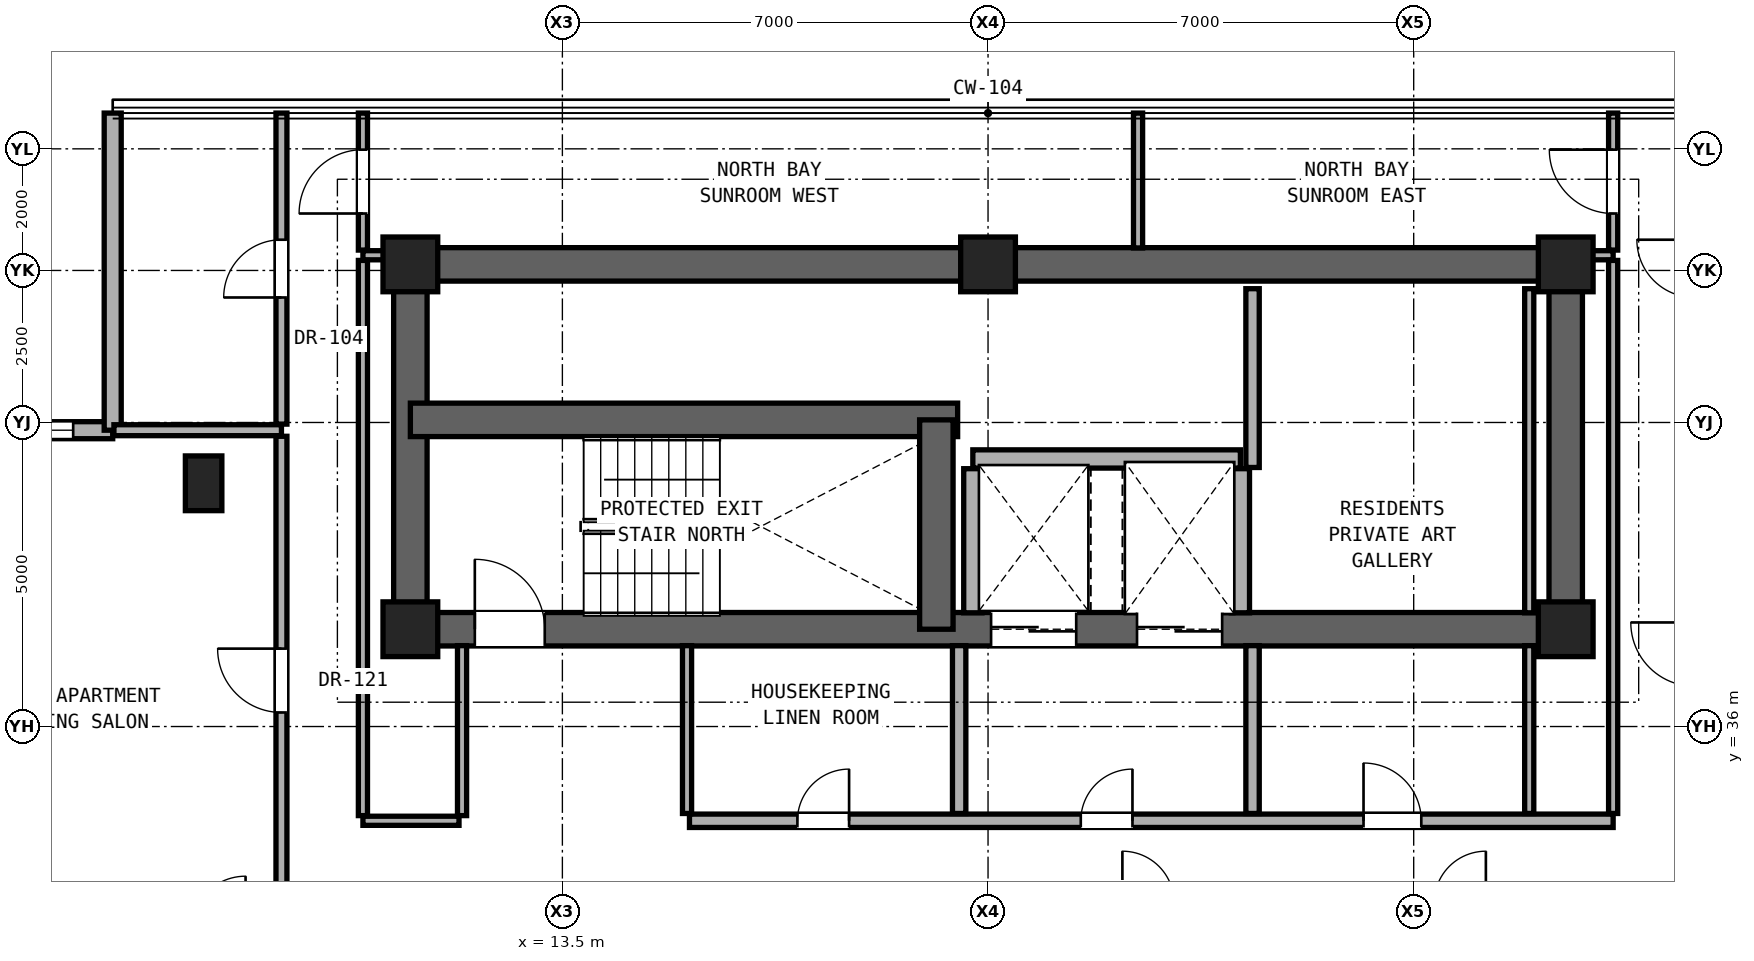
"""IFC4 building model, lengths in metres.
Left out: names, types, materials, properties, quantities, classifications, styles, units other than length and angle.
Written with IfcOpenShell. Run it as: python <this file> out.ifc"""

import sys

from ifc_helpers import new_model, si_unit, direction, frame, frame_2d, origin, origin_2d, place, context, subcontext, project, spatial, rectangle, extrude, element, fill, save


model = new_model("IFC4")
c1 = context("Model", 3, precision=1e-05, world=origin(), true_north=direction((0.0, 1.0)))
c2 = subcontext(c1, "Body", "Model", "MODEL_VIEW")
j1 = project(units=[si_unit("LENGTHUNIT", "METRE"), si_unit("PLANEANGLEUNIT", "RADIAN")], contexts=[c1])
p1 = place(None, origin())
s1 = spatial("IfcSite", under=j1, at=p1, CompositionType="ELEMENT")
p2 = place(p1, origin())
s2 = spatial("IfcBuilding", under=s1, at=p2, CompositionType="ELEMENT")
p3 = place(p2, frame((0.0, 0.0, 186.9)))
s3 = spatial("IfcBuildingStorey", under=s2, at=p3, CompositionType="ELEMENT", Elevation=186.9)
for number, where, z_axis, x_axis in (
    (1, (11.0, 37.6, 0.0), (0.0, 0.0, 1.0), (1.0, 0.0, 0.0)),
    (2, (30.0, 37.6, 0.0), (0.0, 0.0, 1.0), (1.0, 0.0, 0.0)),
    (3, (11.0, 43.6, 0.0), (0.0, 0.0, 1.0), (1.0, 0.0, 0.0)),
    (4, (20.5, 43.6, 0.0), (0.0, 0.0, 1.0), (1.0, 0.0, 0.0)),
    (5, (30.0, 43.6, 0.0), (0.0, 0.0, 1.0), (1.0, 0.0, 0.0)),
):
    element("IfcColumn", number, at=place(p3, frame(where, z_axis=z_axis, x_axis=x_axis)), inside=s3, PredefinedType="COLUMN", context=c2, shape_type="SweptSolid", body=[
        extrude(rectangle(XDim=0.9, YDim=0.9, at=origin_2d()), origin(), (0.0, 0.0, 1.0), 3.25),
    ])
p4 = place(p3, frame((7.6, 40.0, 0.0), z_axis=(0.0, 0.0, 1.0), x_axis=(1.0, 0.0, 0.0)))
e6 = element("IfcColumn", 6, at=p4, inside=s3, PredefinedType="PILASTER", context=c2, shape_type="SweptSolid", body=[
    extrude(rectangle(XDim=0.6, YDim=0.9, at=origin_2d()), origin(), (0.0, 0.0, 1.0), 3.25),
])
p5 = place(p3, frame((11.0, 43.6, 0.0), z_axis=(0.0, 0.0, 1.0), x_axis=(1.0, 0.0, 0.0)))
e7 = element("IfcWall", 7, at=p5, inside=s3, PredefinedType="SHEAR", context=c2, shape_type="SweptSolid", body=[
    extrude(rectangle(XDim=19.0, YDim=0.55, at=frame_2d((9.5, 0.0))), origin(), (0.0, 0.0, 1.0), 3.05),
])
for number, where, z_axis, x_axis in (
    (8, (11.0, 37.6, 0.0), (0.0, 0.0, 1.0), (0.0, 1.0, 0.0)),
    (9, (30.0, 37.6, 0.0), (0.0, 0.0, 1.0), (0.0, 1.0, 0.0)),
):
    element("IfcWall", number, at=place(p3, frame(where, z_axis=z_axis, x_axis=x_axis)), inside=s3, PredefinedType="SHEAR", context=c2, shape_type="SweptSolid", body=[
        extrude(rectangle(XDim=6.0, YDim=0.55, at=frame_2d((3.0, 0.0))), origin(), (0.0, 0.0, 1.0), 3.05),
    ])
p6 = place(p3, frame((11.0, 37.6, 0.0), z_axis=(0.0, 0.0, 1.0), x_axis=(1.0, 0.0, 0.0)))
e10 = element("IfcWall", 10, at=p6, inside=s3, PredefinedType="SHEAR", context=c2, shape_type="SweptSolid", body=[
    extrude(rectangle(XDim=19.0, YDim=0.55, at=frame_2d((9.5, 0.0))), origin(), (0.0, 0.0, 1.0), 3.05),
])
p7 = place(p6, frame((1.06, 0.0, 0.0)))
e11 = element("IfcOpeningElement", 11, at=p7, cuts=e10, PredefinedType="OPENING", context=c2, shape_type="SweptSolid", body=[
    extrude(rectangle(XDim=1.15, YDim=2.2, at=frame_2d((0.575, 1.1))), frame((0.0, 0.285, 0.0), z_axis=(0.0, -1.0, 0.0), x_axis=(1.0, 0.0, 0.0)), (0.0, 0.0, 1.0), 0.57),
])
p8 = place(p6, frame((9.55, 0.0, 0.0)))
e12 = element("IfcOpeningElement", 12, at=p8, cuts=e10, PredefinedType="OPENING", context=c2, shape_type="SweptSolid", body=[
    extrude(rectangle(XDim=1.4, YDim=2.35, at=frame_2d((0.7, 1.175))), frame((0.0, 0.285, 0.0), z_axis=(0.0, -1.0, 0.0), x_axis=(1.0, 0.0, 0.0)), (0.0, 0.0, 1.0), 0.57),
])
p9 = place(p6, frame((11.95, 0.0, 0.0)))
e13 = element("IfcOpeningElement", 13, at=p9, cuts=e10, PredefinedType="OPENING", context=c2, shape_type="SweptSolid", body=[
    extrude(rectangle(XDim=1.4, YDim=2.35, at=frame_2d((0.7, 1.175))), frame((0.0, 0.285, 0.0), z_axis=(0.0, -1.0, 0.0), x_axis=(1.0, 0.0, 0.0)), (0.0, 0.0, 1.0), 0.57),
])
p10 = place(p3, frame((11.0, 41.043, 0.0), z_axis=(0.0, 0.0, 1.0), x_axis=(1.0, 0.0, 0.0)))
e14 = element("IfcWall", 14, at=p10, inside=s3, PredefinedType="SHEAR", context=c2, shape_type="SweptSolid", body=[
    extrude(rectangle(XDim=9.0, YDim=0.55, at=frame_2d((4.5, 0.0))), origin(), (0.0, 0.0, 1.0), 3.05),
])
p11 = place(p3, frame((19.65, 37.6, 0.0), z_axis=(0.0, 0.0, 1.0), x_axis=(0.0, 1.0, 0.0)))
e15 = element("IfcWall", 15, at=p11, inside=s3, PredefinedType="SHEAR", context=c2, shape_type="SweptSolid", body=[
    extrude(rectangle(XDim=3.443, YDim=0.55, at=frame_2d((1.721, 0.0))), origin(), (0.0, 0.0, 1.0), 3.05),
])
p12 = place(p3, frame((6.105, 40.873, 0.0), z_axis=(0.0, 0.0, 1.0), x_axis=(-1.0, 0.0, 0.0)))
e16 = element("IfcWall", 16, at=p12, inside=s3, PredefinedType="SOLIDWALL", context=c2, shape_type="SweptSolid", body=[
    extrude(rectangle(XDim=5.215, YDim=0.28, at=frame_2d((2.607, 0.0))), origin(), (0.0, 0.0, 1.0), 3.03),
])
p13 = place(p12, frame((0.65, 0.0, 0.85)))
e17 = element("IfcOpeningElement", 17, at=p13, cuts=e16, PredefinedType="OPENING", context=c2, shape_type="SweptSolid", body=[
    extrude(rectangle(XDim=1.1, YDim=2.0, at=frame_2d((0.55, 1.0))), frame((0.0, 0.15, 0.0), z_axis=(0.0, -1.0, 0.0), x_axis=(1.0, 0.0, 0.0)), (0.0, 0.0, 1.0), 0.3),
])
p14 = place(p3, frame((6.105, 46.088, 0.0), z_axis=(0.0, 0.0, 1.0), x_axis=(0.0, -1.0, 0.0)))
e18 = element("IfcWall", 18, at=p14, inside=s3, PredefinedType="SOLIDWALL", context=c2, shape_type="SweptSolid", body=[
    extrude(rectangle(XDim=5.215, YDim=0.28, at=frame_2d((2.607, 0.0))), origin(), (0.0, 0.0, 1.0), 3.03),
])
p15 = place(p3, frame((10.22, 34.45, 0.0), z_axis=(0.0, 0.0, 1.0), x_axis=(1.0, 0.0, 0.0)))
e19 = element("IfcWall", 19, at=p15, inside=s3, PredefinedType="PARTITIONING", context=c2, shape_type="SweptSolid", body=[
    extrude(rectangle(XDim=1.58, YDim=0.15, at=frame_2d((0.79, 0.0))), origin(), (0.0, 0.0, 1.0), 2.186),
])
p16 = place(p3, frame((15.59, 34.45, 0.0), z_axis=(0.0, 0.0, 1.0), x_axis=(1.0, 0.0, 0.0)))
e20 = element("IfcWall", 20, at=p16, inside=s3, PredefinedType="SOLIDWALL", context=c2, shape_type="SweptSolid", body=[
    extrude(rectangle(XDim=15.19, YDim=0.22, at=frame_2d((7.595, 0.0))), origin(), (0.0, 0.0, 1.0), 2.186),
])
p17 = place(p16, frame((6.435, 0.0, 0.0)))
e21 = element("IfcOpeningElement", 21, at=p17, cuts=e20, PredefinedType="OPENING", context=c2, shape_type="SweptSolid", body=[
    extrude(rectangle(XDim=0.85, YDim=2.01, at=frame_2d((0.425, 1.005))), frame((0.0, 0.12, 0.0), z_axis=(0.0, -1.0, 0.0), x_axis=(1.0, 0.0, 0.0)), (0.0, 0.0, 1.0), 0.24),
])
p18 = place(p16, frame((11.085, 0.0, 0.0)))
e22 = element("IfcOpeningElement", 22, at=p18, cuts=e20, PredefinedType="OPENING", context=c2, shape_type="SweptSolid", body=[
    extrude(rectangle(XDim=0.95, YDim=2.15, at=frame_2d((0.475, 1.075))), frame((0.0, 0.12, 0.0), z_axis=(0.0, -1.0, 0.0), x_axis=(1.0, 0.0, 0.0)), (0.0, 0.0, 1.0), 0.24),
])
p19 = place(p16, frame((1.775, 0.0, 0.0)))
e23 = element("IfcOpeningElement", 23, at=p19, cuts=e20, PredefinedType="OPENING", context=c2, shape_type="SweptSolid", body=[
    extrude(rectangle(XDim=0.85, YDim=2.01, at=frame_2d((0.425, 1.005))), frame((0.0, 0.12, 0.0), z_axis=(0.0, -1.0, 0.0), x_axis=(1.0, 0.0, 0.0)), (0.0, 0.0, 1.0), 0.24),
])
p20 = place(p3, frame((20.25, 40.4, 0.0), z_axis=(0.0, 0.0, 1.0), x_axis=(1.0, 0.0, 0.0)))
e24 = element("IfcWall", 24, at=p20, inside=s3, PredefinedType="SOLIDWALL", context=c2, shape_type="SweptSolid", body=[
    extrude(rectangle(XDim=4.4, YDim=0.3, at=frame_2d((2.2, 0.0))), origin(), (0.0, 0.0, 1.0), 3.05),
])
p21 = place(p3, frame((6.125, 40.873, 0.0), z_axis=(0.0, 0.0, 1.0), x_axis=(1.0, 0.0, 0.0)))
e25 = element("IfcWall", 25, at=p21, inside=s3, PredefinedType="PARTITIONING", context=c2, shape_type="SweptSolid", body=[
    extrude(rectangle(XDim=2.755, YDim=0.18, at=frame_2d((1.377, 0.0))), origin(), (0.0, 0.0, 1.0), 3.05),
])
for number, where, z_axis, x_axis in (
    (26, (10.22, 43.75, 0.0), (0.0, 0.0, 1.0), (1.0, 0.0, 0.0)),
    (27, (30.27, 43.75, 0.0), (0.0, 0.0, 1.0), (1.0, 0.0, 0.0)),
):
    element("IfcWall", number, at=place(p3, frame(where, z_axis=z_axis, x_axis=x_axis)), inside=s3, PredefinedType="PARTITIONING", context=c2, shape_type="SweptSolid", body=[
        extrude(rectangle(XDim=0.51, YDim=0.15, at=frame_2d((0.255, 0.0))), origin(), (0.0, 0.0, 1.0), 3.05),
    ])
p22 = place(p3, frame((8.88, 32.739, 0.0), z_axis=(0.0, 0.0, 1.0), x_axis=(0.0, 1.0, 0.0)))
e28 = element("IfcWall", 28, at=p22, inside=s3, PredefinedType="PARTITIONING", context=c2, shape_type="SweptSolid", body=[
    extrude(rectangle(XDim=8.034, YDim=0.18, at=frame_2d((4.017, 0.0))), origin(), (0.0, 0.0, 1.0), 2.442),
])
p23 = place(p22, frame((3.492, 0.0, 0.0)))
e29 = element("IfcOpeningElement", 29, at=p23, cuts=e28, PredefinedType="OPENING", context=c2, shape_type="SweptSolid", body=[
    extrude(rectangle(XDim=1.05, YDim=2.2, at=frame_2d((0.525, 1.1))), frame((0.0, 0.1, 0.0), z_axis=(0.0, -1.0, 0.0), x_axis=(1.0, 0.0, 0.0)), (0.0, 0.0, 1.0), 0.2),
])
p24 = place(p3, frame((8.88, 40.973, 0.0), z_axis=(0.0, 0.0, 1.0), x_axis=(0.0, 1.0, 0.0)))
e30 = element("IfcWall", 30, at=p24, inside=s3, PredefinedType="PARTITIONING", context=c2, shape_type="SweptSolid", body=[
    extrude(rectangle(XDim=5.115, YDim=0.18, at=frame_2d((2.558, 0.0))), origin(), (0.0, 0.0, 1.0), 3.05),
])
p25 = place(p24, frame((2.083, 0.0, 0.0)))
e31 = element("IfcOpeningElement", 31, at=p25, cuts=e30, PredefinedType="OPENING", context=c2, shape_type="SweptSolid", body=[
    extrude(rectangle(XDim=0.95, YDim=2.15, at=frame_2d((0.475, 1.075))), frame((0.0, 0.1, 0.0), z_axis=(0.0, -1.0, 0.0), x_axis=(1.0, 0.0, 0.0)), (0.0, 0.0, 1.0), 0.2),
])
p26 = place(p3, frame((10.22, 34.535, 0.0), z_axis=(0.0, 0.0, 1.0), x_axis=(0.0, 1.0, 0.0)))
e32 = element("IfcWall", 32, at=p26, inside=s3, PredefinedType="PARTITIONING", context=c2, shape_type="SweptSolid", body=[
    extrude(rectangle(XDim=9.13, YDim=0.15, at=frame_2d((4.565, 0.0))), origin(), (0.0, 0.0, 1.0), 2.442),
])
p27 = place(p3, frame((10.22, 43.835, 0.0), z_axis=(0.0, 0.0, 1.0), x_axis=(0.0, 1.0, 0.0)))
e33 = element("IfcWall", 33, at=p27, inside=s3, PredefinedType="PARTITIONING", context=c2, shape_type="SweptSolid", body=[
    extrude(rectangle(XDim=2.253, YDim=0.15, at=frame_2d((1.126, 0.0))), origin(), (0.0, 0.0, 1.0), 3.05),
])
p28 = place(p27, frame((0.602, 0.0, 0.0)))
e34 = element("IfcOpeningElement", 34, at=p28, cuts=e33, PredefinedType="OPENING", context=c2, shape_type="SweptSolid", body=[
    extrude(rectangle(XDim=1.05, YDim=2.2, at=frame_2d((0.525, 1.1))), frame((0.0, 0.085, 0.0), z_axis=(0.0, -1.0, 0.0), x_axis=(1.0, 0.0, 0.0)), (0.0, 0.0, 1.0), 0.17),
])
p29 = place(p3, frame((11.85, 34.535, 0.0), z_axis=(0.0, 0.0, 1.0), x_axis=(0.0, 1.0, 0.0)))
e35 = element("IfcWall", 35, at=p29, inside=s3, PredefinedType="PARTITIONING", context=c2, shape_type="SweptSolid", body=[
    extrude(rectangle(XDim=2.795, YDim=0.15, at=frame_2d((1.397, 0.0))), origin(), (0.0, 0.0, 1.0), 3.05),
])
p30 = place(p3, frame((15.55, 34.57, 0.0), z_axis=(0.0, 0.0, 1.0), x_axis=(0.0, 1.0, 0.0)))
e36 = element("IfcWall", 36, at=p30, inside=s3, PredefinedType="PARTITIONING", context=c2, shape_type="SweptSolid", body=[
    extrude(rectangle(XDim=2.76, YDim=0.15, at=frame_2d((1.38, 0.0))), origin(), (0.0, 0.0, 1.0), 3.05),
])
p31 = place(p3, frame((20.025, 34.57, 0.0), z_axis=(0.0, 0.0, 1.0), x_axis=(0.0, 1.0, 0.0)))
e37 = element("IfcWall", 37, at=p31, inside=s3, PredefinedType="SOLIDWALL", context=c2, shape_type="SweptSolid", body=[
    extrude(rectangle(XDim=2.76, YDim=0.22, at=frame_2d((1.38, 0.0))), origin(), (0.0, 0.0, 1.0), 3.05),
])
p32 = place(p3, frame((20.25, 37.87, 0.0), z_axis=(0.0, 0.0, 1.0), x_axis=(0.0, 1.0, 0.0)))
e38 = element("IfcWall", 38, at=p32, inside=s3, PredefinedType="SOLIDWALL", context=c2, shape_type="SweptSolid", body=[
    extrude(rectangle(XDim=2.37, YDim=0.3, at=frame_2d((1.185, 0.0))), origin(), (0.0, 0.0, 1.0), 3.05),
])
p33 = place(p3, frame((22.967, 43.87, 0.0), z_axis=(0.0, 0.0, 1.0), x_axis=(0.0, 1.0, 0.0)))
e39 = element("IfcWall", 39, at=p33, inside=s3, PredefinedType="PARTITIONING", context=c2, shape_type="SweptSolid", body=[
    extrude(rectangle(XDim=2.218, YDim=0.15, at=frame_2d((1.109, 0.0))), origin(), (0.0, 0.0, 1.0), 3.05),
])
p34 = place(p3, frame((24.65, 37.87, 0.0), z_axis=(0.0, 0.0, 1.0), x_axis=(0.0, 1.0, 0.0)))
e40 = element("IfcWall", 40, at=p34, inside=s3, PredefinedType="SOLIDWALL", context=c2, shape_type="SweptSolid", body=[
    extrude(rectangle(XDim=2.37, YDim=0.3, at=frame_2d((1.185, 0.0))), origin(), (0.0, 0.0, 1.0), 3.05),
])
p35 = place(p3, frame((24.85, 34.57, 0.0), z_axis=(0.0, 0.0, 1.0), x_axis=(0.0, 1.0, 0.0)))
e41 = element("IfcWall", 41, at=p35, inside=s3, PredefinedType="SOLIDWALL", context=c2, shape_type="SweptSolid", body=[
    extrude(rectangle(XDim=2.76, YDim=0.22, at=frame_2d((1.38, 0.0))), origin(), (0.0, 0.0, 1.0), 3.05),
])
p36 = place(p3, frame((24.85, 40.26, 0.0), z_axis=(0.0, 0.0, 1.0), x_axis=(0.0, 1.0, 0.0)))
e42 = element("IfcWall", 42, at=p36, inside=s3, PredefinedType="SOLIDWALL", context=c2, shape_type="SweptSolid", body=[
    extrude(rectangle(XDim=2.94, YDim=0.22, at=frame_2d((1.47, 0.0))), origin(), (0.0, 0.0, 1.0), 3.05),
])
p37 = place(p3, frame((29.4, 34.57, 0.0), z_axis=(0.0, 0.0, 1.0), x_axis=(0.0, 1.0, 0.0)))
e43 = element("IfcWall", 43, at=p37, inside=s3, PredefinedType="PARTITIONING", context=c2, shape_type="SweptSolid", body=[
    extrude(rectangle(XDim=2.76, YDim=0.15, at=frame_2d((1.38, 0.0))), origin(), (0.0, 0.0, 1.0), 3.05),
])
p38 = place(p3, frame((29.4, 37.87, 0.0), z_axis=(0.0, 0.0, 1.0), x_axis=(0.0, 1.0, 0.0)))
e44 = element("IfcWall", 44, at=p38, inside=s3, PredefinedType="PARTITIONING", context=c2, shape_type="SweptSolid", body=[
    extrude(rectangle(XDim=5.33, YDim=0.15, at=frame_2d((2.665, 0.0))), origin(), (0.0, 0.0, 1.0), 3.05),
])
p39 = place(p3, frame((30.78, 34.57, 0.0), z_axis=(0.0, 0.0, 1.0), x_axis=(0.0, 1.0, 0.0)))
e45 = element("IfcWall", 45, at=p39, inside=s3, PredefinedType="PARTITIONING", context=c2, shape_type="SweptSolid", body=[
    extrude(rectangle(XDim=9.095, YDim=0.15, at=frame_2d((4.547, 0.0))), origin(), (0.0, 0.0, 1.0), 2.442),
])
p40 = place(p3, frame((30.78, 43.835, 0.0), z_axis=(0.0, 0.0, 1.0), x_axis=(0.0, 1.0, 0.0)))
e46 = element("IfcWall", 46, at=p40, inside=s3, PredefinedType="PARTITIONING", context=c2, shape_type="SweptSolid", body=[
    extrude(rectangle(XDim=2.253, YDim=0.15, at=frame_2d((1.126, 0.0))), origin(), (0.0, 0.0, 1.0), 3.05),
])
p41 = place(p40, frame((0.602, 0.0, 0.0)))
e47 = element("IfcOpeningElement", 47, at=p41, cuts=e46, PredefinedType="OPENING", context=c2, shape_type="SweptSolid", body=[
    extrude(rectangle(XDim=1.05, YDim=2.2, at=frame_2d((0.525, 1.1))), frame((0.0, 0.085, 0.0), z_axis=(0.0, -1.0, 0.0), x_axis=(1.0, 0.0, 0.0)), (0.0, 0.0, 1.0), 0.17),
])
p42 = place(p13, origin())
e48 = element("IfcWindow", 48, at=p42, inside=s3, PartitioningType="SINGLE_PANEL", PredefinedType="WINDOW", context=c2, shape_type="SweptSolid", body=[
    extrude(rectangle(XDim=1.1, YDim=2.0, at=frame_2d((0.55, 1.0))), frame((0.0, 0.03, 0.0), z_axis=(0.0, -1.0, 0.0), x_axis=(1.0, 0.0, 0.0)), (0.0, 0.0, 1.0), 0.06),
])
fill(e17, e48)
p43 = place(p7, origin())
e49 = element("IfcDoor", 49, at=p43, inside=s3, OperationType="SINGLE_SWING_LEFT", PredefinedType="DOOR", context=c2, shape_type="SweptSolid", body=[
    extrude(rectangle(XDim=1.15, YDim=2.2, at=frame_2d((0.575, 1.1))), frame((0.0, 0.025, 0.0), z_axis=(0.0, -1.0, 0.0), x_axis=(1.0, 0.0, 0.0)), (0.0, 0.0, 1.0), 0.05),
])
fill(e11, e49)
p44 = place(p17, origin())
e50 = element("IfcDoor", 50, at=p44, inside=s3, OperationType="SINGLE_SWING_RIGHT", PredefinedType="DOOR", context=c2, shape_type="SweptSolid", body=[
    extrude(rectangle(XDim=0.85, YDim=2.01, at=frame_2d((0.425, 1.005))), frame((0.0, 0.025, 0.0), z_axis=(0.0, -1.0, 0.0), x_axis=(1.0, 0.0, 0.0)), (0.0, 0.0, 1.0), 0.05),
])
fill(e21, e50)
p45 = place(p18, origin())
e51 = element("IfcDoor", 51, at=p45, inside=s3, OperationType="SINGLE_SWING_LEFT", PredefinedType="DOOR", context=c2, shape_type="SweptSolid", body=[
    extrude(rectangle(XDim=0.95, YDim=2.15, at=frame_2d((0.475, 1.075))), frame((0.0, 0.025, 0.0), z_axis=(0.0, -1.0, 0.0), x_axis=(1.0, 0.0, 0.0)), (0.0, 0.0, 1.0), 0.05),
])
fill(e22, e51)
p46 = place(p19, origin())
e52 = element("IfcDoor", 52, at=p46, inside=s3, OperationType="SINGLE_SWING_RIGHT", PredefinedType="DOOR", context=c2, shape_type="SweptSolid", body=[
    extrude(rectangle(XDim=0.85, YDim=2.01, at=frame_2d((0.425, 1.005))), frame((0.0, 0.025, 0.0), z_axis=(0.0, -1.0, 0.0), x_axis=(1.0, 0.0, 0.0)), (0.0, 0.0, 1.0), 0.05),
])
fill(e23, e52)
p47 = place(p23, origin())
e53 = element("IfcDoor", 53, at=p47, inside=s3, OperationType="SINGLE_SWING_RIGHT", PredefinedType="DOOR", context=c2, shape_type="SweptSolid", body=[
    extrude(rectangle(XDim=1.05, YDim=2.2, at=frame_2d((0.525, 1.1))), frame((0.0, 0.025, 0.0), z_axis=(0.0, -1.0, 0.0), x_axis=(1.0, 0.0, 0.0)), (0.0, 0.0, 1.0), 0.05),
])
fill(e29, e53)
p48 = place(p28, origin())
e54 = element("IfcDoor", 54, at=p48, inside=s3, OperationType="SINGLE_SWING_LEFT", PredefinedType="DOOR", context=c2, shape_type="SweptSolid", body=[
    extrude(rectangle(XDim=1.05, YDim=2.2, at=frame_2d((0.525, 1.1))), frame((0.0, 0.025, 0.0), z_axis=(0.0, -1.0, 0.0), x_axis=(1.0, 0.0, 0.0)), (0.0, 0.0, 1.0), 0.05),
])
fill(e34, e54)
p49 = place(p41, origin())
e55 = element("IfcDoor", 55, at=p49, inside=s3, OperationType="SINGLE_SWING_RIGHT", PredefinedType="DOOR", context=c2, shape_type="SweptSolid", body=[
    extrude(rectangle(XDim=1.05, YDim=2.2, at=frame_2d((0.525, 1.1))), frame((0.0, 0.025, 0.0), z_axis=(0.0, -1.0, 0.0), x_axis=(1.0, 0.0, 0.0)), (0.0, 0.0, 1.0), 0.05),
])
fill(e47, e55)
p50 = place(p25, origin())
e56 = element("IfcDoor", 56, at=p50, inside=s3, OperationType="SINGLE_SWING_LEFT", PredefinedType="DOOR", context=c2, shape_type="SweptSolid", body=[
    extrude(rectangle(XDim=0.95, YDim=2.15, at=frame_2d((0.475, 1.075))), frame((0.0, 0.025, 0.0), z_axis=(0.0, -1.0, 0.0), x_axis=(1.0, 0.0, 0.0)), (0.0, 0.0, 1.0), 0.05),
])
fill(e31, e56)
p51 = place(p8, origin())
e57 = element("IfcDoor", 57, at=p51, inside=s3, OperationType="DOUBLE_DOOR_SLIDING", PredefinedType="DOOR", context=c2, shape_type="SweptSolid", body=[
    extrude(rectangle(XDim=1.4, YDim=2.35, at=frame_2d((0.7, 1.175))), frame((0.0, 0.025, 0.0), z_axis=(0.0, -1.0, 0.0), x_axis=(1.0, 0.0, 0.0)), (0.0, 0.0, 1.0), 0.05),
])
fill(e12, e57)
p52 = place(p9, origin())
e58 = element("IfcDoor", 58, at=p52, inside=s3, OperationType="DOUBLE_DOOR_SLIDING", PredefinedType="DOOR", context=c2, shape_type="SweptSolid", body=[
    extrude(rectangle(XDim=1.4, YDim=2.35, at=frame_2d((0.7, 1.175))), frame((0.0, 0.025, 0.0), z_axis=(0.0, -1.0, 0.0), x_axis=(1.0, 0.0, 0.0)), (0.0, 0.0, 1.0), 0.05),
])
fill(e13, e58)
save(model, sys.argv[1])
